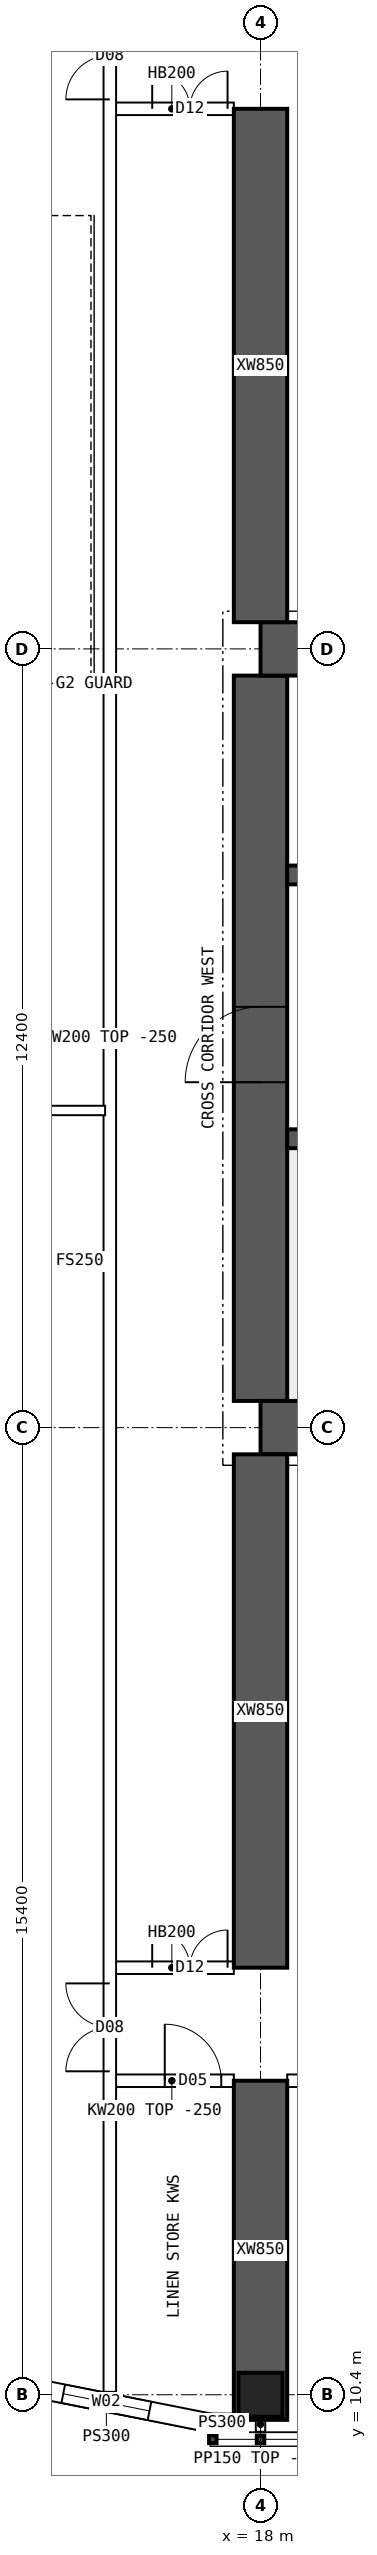
"""IFC4 building model, lengths in metres.
Left out: names, types, materials, properties, quantities, classifications, styles, units other than length and angle.
Written with IfcOpenShell. Run it as: python <this file> out.ifc"""

import sys

from ifc_helpers import new_model, si_unit, direction, frame, frame_2d, origin, origin_2d, place, context, subcontext, project, spatial, polyline, rectangle, hollow_rectangle, outline, extrude, element, fill, save


model = new_model("IFC4")
c1 = context("Model", 3, precision=1e-05, world=origin(), true_north=direction((0.0, 1.0)))
c2 = subcontext(c1, "Body", "Model", "MODEL_VIEW")
j1 = project(units=[si_unit("LENGTHUNIT", "METRE"), si_unit("PLANEANGLEUNIT", "RADIAN")], contexts=[c1])
p1 = place(None, origin())
s1 = spatial("IfcSite", under=j1, at=p1, CompositionType="ELEMENT")
p2 = place(p1, origin())
s2 = spatial("IfcBuilding", under=s1, at=p2, CompositionType="ELEMENT")
p3 = place(p2, frame((0.0, 0.0, 152.35)))
s3 = spatial("IfcBuildingStorey", under=s2, at=p3, CompositionType="ELEMENT", Elevation=152.35)
p4 = place(p3, frame((18.0, 10.4, 0.0), z_axis=(0.0, 0.0, 1.0), x_axis=(1.0, 0.0, 0.0)))
e1 = element("IfcColumn", 1, at=p4, inside=s3, PredefinedType="COLUMN", context=c2, shape_type="SweptSolid", body=[
    extrude(hollow_rectangle(XDim=0.7, YDim=0.7, WallThickness=0.07, at=origin_2d()), origin(), (0.0, 0.0, 1.0), 3.75),
])
for number, where, z_axis, x_axis in (
    (2, (18.0, 25.8, 0.0), (0.0, 0.0, 1.0), (1.0, 0.0, 0.0)),
    (3, (18.0, 38.2, 0.0), (0.0, 0.0, 1.0), (1.0, 0.0, 0.0)),
):
    element("IfcWall", number, at=place(p3, frame(where, z_axis=z_axis, x_axis=x_axis)), inside=s3, PredefinedType="SHEAR", context=c2, shape_type="SweptSolid", body=[
        extrude(rectangle(XDim=48.0, YDim=0.85, at=frame_2d((24.0, 0.0))), origin(), (0.0, 0.0, 1.0), 3.75),
    ])
p5 = place(p3, frame((18.0, 26.225, 0.0), z_axis=(0.0, 0.0, 1.0), x_axis=(0.0, 1.0, 0.0)))
e4 = element("IfcWall", 4, at=p5, inside=s3, PredefinedType="SHEAR", context=c2, shape_type="SweptSolid", body=[
    extrude(rectangle(XDim=11.55, YDim=0.85, at=frame_2d((5.775, 0.0))), origin(), (0.0, 0.0, 1.0), 3.75),
])
p6 = place(p5, frame((5.075, 0.0, 0.0)))
e5 = element("IfcOpeningElement", 5, at=p6, cuts=e4, PredefinedType="OPENING", context=c2, shape_type="SweptSolid", body=[
    extrude(rectangle(XDim=1.2, YDim=2.1, at=frame_2d((0.6, 1.05))), frame((0.0, 0.435, 0.0), z_axis=(0.0, -1.0, 0.0), x_axis=(1.0, 0.0, 0.0)), (0.0, 0.0, 1.0), 0.87),
])
p7 = place(p3, frame((18.425, 30.4, 0.0), z_axis=(0.0, 0.0, 1.0), x_axis=(1.0, 0.0, 0.0)))
e6 = element("IfcWall", 6, at=p7, inside=s3, PredefinedType="SHEAR", context=c2, shape_type="SweptSolid", body=[
    extrude(rectangle(XDim=47.15, YDim=0.3, at=frame_2d((23.575, 0.0))), origin(), (0.0, 0.0, 1.0), 3.75),
])
p8 = place(p7, frame((0.4, 0.0, 0.0)))
e7 = element("IfcOpeningElement", 7, at=p8, cuts=e6, PredefinedType="OPENING", context=c2, shape_type="SweptSolid", body=[
    extrude(rectangle(XDim=1.0, YDim=2.1, at=frame_2d((0.5, 1.05))), frame((0.0, 0.16, 0.0), z_axis=(0.0, -1.0, 0.0), x_axis=(1.0, 0.0, 0.0)), (0.0, 0.0, 1.0), 0.32),
])
p9 = place(p7, frame((45.75, 0.0, 0.0)))
e8 = element("IfcOpeningElement", 8, at=p9, cuts=e6, PredefinedType="OPENING", context=c2, shape_type="SweptSolid", body=[
    extrude(rectangle(XDim=1.0, YDim=2.1, at=frame_2d((0.5, 1.05))), frame((0.0, 0.16, 0.0), z_axis=(0.0, -1.0, 0.0), x_axis=(1.0, 0.0, 0.0)), (0.0, 0.0, 1.0), 0.32),
])
p10 = place(p7, frame((8.325, 0.0, 0.0)))
e9 = element("IfcOpeningElement", 9, at=p10, cuts=e6, PredefinedType="OPENING", context=c2, shape_type="SweptSolid", body=[
    extrude(rectangle(XDim=1.1, YDim=2.1, at=frame_2d((0.55, 1.05))), frame((0.0, 0.16, 0.0), z_axis=(0.0, -1.0, 0.0), x_axis=(1.0, 0.0, 0.0)), (0.0, 0.0, 1.0), 0.32),
])
p11 = place(p7, frame((10.925, 0.0, 0.0)))
e10 = element("IfcOpeningElement", 10, at=p11, cuts=e6, PredefinedType="OPENING", context=c2, shape_type="SweptSolid", body=[
    extrude(rectangle(XDim=1.1, YDim=2.1, at=frame_2d((0.55, 1.05))), frame((0.0, 0.16, 0.0), z_axis=(0.0, -1.0, 0.0), x_axis=(1.0, 0.0, 0.0)), (0.0, 0.0, 1.0), 0.32),
])
p12 = place(p7, frame((13.525, 0.0, 0.0)))
e11 = element("IfcOpeningElement", 11, at=p12, cuts=e6, PredefinedType="OPENING", context=c2, shape_type="SweptSolid", body=[
    extrude(rectangle(XDim=1.1, YDim=2.1, at=frame_2d((0.55, 1.05))), frame((0.0, 0.16, 0.0), z_axis=(0.0, -1.0, 0.0), x_axis=(1.0, 0.0, 0.0)), (0.0, 0.0, 1.0), 0.32),
])
p13 = place(p7, frame((16.125, 0.0, 0.0)))
e12 = element("IfcOpeningElement", 12, at=p13, cuts=e6, PredefinedType="OPENING", context=c2, shape_type="SweptSolid", body=[
    extrude(rectangle(XDim=1.1, YDim=2.1, at=frame_2d((0.55, 1.05))), frame((0.0, 0.16, 0.0), z_axis=(0.0, -1.0, 0.0), x_axis=(1.0, 0.0, 0.0)), (0.0, 0.0, 1.0), 0.32),
])
p14 = place(p7, frame((18.9, 0.0, 0.0)))
e13 = element("IfcOpeningElement", 13, at=p14, cuts=e6, PredefinedType="OPENING", context=c2, shape_type="SweptSolid", body=[
    extrude(rectangle(XDim=0.9, YDim=2.1, at=frame_2d((0.45, 1.05))), frame((0.0, 0.16, 0.0), z_axis=(0.0, -1.0, 0.0), x_axis=(1.0, 0.0, 0.0)), (0.0, 0.0, 1.0), 0.32),
])
p15 = place(p7, frame((30.192, 0.0, 0.0)))
e14 = element("IfcOpeningElement", 14, at=p15, cuts=e6, PredefinedType="OPENING", context=c2, shape_type="SweptSolid", body=[
    extrude(rectangle(XDim=1.1, YDim=2.1, at=frame_2d((0.55, 1.05))), frame((0.0, 0.16, 0.0), z_axis=(0.0, -1.0, 0.0), x_axis=(1.0, 0.0, 0.0)), (0.0, 0.0, 1.0), 0.32),
])
p16 = place(p7, frame((33.725, 0.0, 0.0)))
e15 = element("IfcOpeningElement", 15, at=p16, cuts=e6, PredefinedType="OPENING", context=c2, shape_type="SweptSolid", body=[
    extrude(rectangle(XDim=1.1, YDim=2.1, at=frame_2d((0.55, 1.05))), frame((0.0, 0.16, 0.0), z_axis=(0.0, -1.0, 0.0), x_axis=(1.0, 0.0, 0.0)), (0.0, 0.0, 1.0), 0.32),
])
p17 = place(p7, frame((37.258, 0.0, 0.0)))
e16 = element("IfcOpeningElement", 16, at=p17, cuts=e6, PredefinedType="OPENING", context=c2, shape_type="SweptSolid", body=[
    extrude(rectangle(XDim=1.1, YDim=2.1, at=frame_2d((0.55, 1.05))), frame((0.0, 0.16, 0.0), z_axis=(0.0, -1.0, 0.0), x_axis=(1.0, 0.0, 0.0)), (0.0, 0.0, 1.0), 0.32),
])
p18 = place(p3, frame((18.425, 34.6, 0.0), z_axis=(0.0, 0.0, 1.0), x_axis=(1.0, 0.0, 0.0)))
e17 = element("IfcWall", 17, at=p18, inside=s3, PredefinedType="SHEAR", context=c2, shape_type="SweptSolid", body=[
    extrude(rectangle(XDim=47.15, YDim=0.3, at=frame_2d((23.575, 0.0))), origin(), (0.0, 0.0, 1.0), 3.75),
])
p19 = place(p18, frame((0.9, 0.0, 0.0)))
e18 = element("IfcOpeningElement", 18, at=p19, cuts=e17, PredefinedType="OPENING", context=c2, shape_type="SweptSolid", body=[
    extrude(rectangle(XDim=1.1, YDim=2.1, at=frame_2d((0.55, 1.05))), frame((0.0, 0.16, 0.0), z_axis=(0.0, -1.0, 0.0), x_axis=(1.0, 0.0, 0.0)), (0.0, 0.0, 1.0), 0.32),
])
p20 = place(p18, frame((45.15, 0.0, 0.0)))
e19 = element("IfcOpeningElement", 19, at=p20, cuts=e17, PredefinedType="OPENING", context=c2, shape_type="SweptSolid", body=[
    extrude(rectangle(XDim=1.1, YDim=2.1, at=frame_2d((0.55, 1.05))), frame((0.0, 0.16, 0.0), z_axis=(0.0, -1.0, 0.0), x_axis=(1.0, 0.0, 0.0)), (0.0, 0.0, 1.0), 0.32),
])
p21 = place(p18, frame((4.175, 0.0, 0.0)))
e20 = element("IfcOpeningElement", 20, at=p21, cuts=e17, PredefinedType="OPENING", context=c2, shape_type="SweptSolid", body=[
    extrude(rectangle(XDim=0.9, YDim=2.1, at=frame_2d((0.45, 1.05))), frame((0.0, 0.16, 0.0), z_axis=(0.0, -1.0, 0.0), x_axis=(1.0, 0.0, 0.0)), (0.0, 0.0, 1.0), 0.32),
])
p22 = place(p18, frame((42.075, 0.0, 0.0)))
e21 = element("IfcOpeningElement", 21, at=p22, cuts=e17, PredefinedType="OPENING", context=c2, shape_type="SweptSolid", body=[
    extrude(rectangle(XDim=0.9, YDim=2.1, at=frame_2d((0.45, 1.05))), frame((0.0, 0.16, 0.0), z_axis=(0.0, -1.0, 0.0), x_axis=(1.0, 0.0, 0.0)), (0.0, 0.0, 1.0), 0.32),
])
p23 = place(p18, frame((8.95, 0.0, 0.0)))
e22 = element("IfcOpeningElement", 22, at=p23, cuts=e17, PredefinedType="OPENING", context=c2, shape_type="SweptSolid", body=[
    extrude(rectangle(XDim=0.9, YDim=2.1, at=frame_2d((0.45, 1.05))), frame((0.0, 0.16, 0.0), z_axis=(0.0, -1.0, 0.0), x_axis=(1.0, 0.0, 0.0)), (0.0, 0.0, 1.0), 0.32),
])
p24 = place(p18, frame((12.924, 0.0, 0.0)))
e23 = element("IfcOpeningElement", 23, at=p24, cuts=e17, PredefinedType="OPENING", context=c2, shape_type="SweptSolid", body=[
    extrude(rectangle(XDim=0.9, YDim=2.1, at=frame_2d((0.45, 1.05))), frame((0.0, 0.16, 0.0), z_axis=(0.0, -1.0, 0.0), x_axis=(1.0, 0.0, 0.0)), (0.0, 0.0, 1.0), 0.32),
])
p25 = place(p18, frame((16.571, 0.0, 0.0)))
e24 = element("IfcOpeningElement", 24, at=p25, cuts=e17, PredefinedType="OPENING", context=c2, shape_type="SweptSolid", body=[
    extrude(rectangle(XDim=0.9, YDim=2.1, at=frame_2d((0.45, 1.05))), frame((0.0, 0.16, 0.0), z_axis=(0.0, -1.0, 0.0), x_axis=(1.0, 0.0, 0.0)), (0.0, 0.0, 1.0), 0.32),
])
p26 = place(p18, frame((20.33, 0.0, 0.0)))
e25 = element("IfcOpeningElement", 25, at=p26, cuts=e17, PredefinedType="OPENING", context=c2, shape_type="SweptSolid", body=[
    extrude(rectangle(XDim=0.9, YDim=2.1, at=frame_2d((0.45, 1.05))), frame((0.0, 0.16, 0.0), z_axis=(0.0, -1.0, 0.0), x_axis=(1.0, 0.0, 0.0)), (0.0, 0.0, 1.0), 0.32),
])
p27 = place(p18, frame((24.736, 0.0, 0.0)))
e26 = element("IfcOpeningElement", 26, at=p27, cuts=e17, PredefinedType="OPENING", context=c2, shape_type="SweptSolid", body=[
    extrude(rectangle(XDim=0.9, YDim=2.1, at=frame_2d((0.45, 1.05))), frame((0.0, 0.16, 0.0), z_axis=(0.0, -1.0, 0.0), x_axis=(1.0, 0.0, 0.0)), (0.0, 0.0, 1.0), 0.32),
])
p28 = place(p18, frame((27.533, 0.0, 0.0)))
e27 = element("IfcOpeningElement", 27, at=p28, cuts=e17, PredefinedType="OPENING", context=c2, shape_type="SweptSolid", body=[
    extrude(rectangle(XDim=0.9, YDim=2.1, at=frame_2d((0.45, 1.05))), frame((0.0, 0.16, 0.0), z_axis=(0.0, -1.0, 0.0), x_axis=(1.0, 0.0, 0.0)), (0.0, 0.0, 1.0), 0.32),
])
p29 = place(p18, frame((29.703, 0.0, 0.0)))
e28 = element("IfcOpeningElement", 28, at=p29, cuts=e17, PredefinedType="OPENING", context=c2, shape_type="SweptSolid", body=[
    extrude(rectangle(XDim=0.9, YDim=2.1, at=frame_2d((0.45, 1.05))), frame((0.0, 0.16, 0.0), z_axis=(0.0, -1.0, 0.0), x_axis=(1.0, 0.0, 0.0)), (0.0, 0.0, 1.0), 0.32),
])
p30 = place(p18, frame((33.502, 0.0, 0.0)))
e29 = element("IfcOpeningElement", 29, at=p30, cuts=e17, PredefinedType="OPENING", context=c2, shape_type="SweptSolid", body=[
    extrude(rectangle(XDim=0.9, YDim=2.1, at=frame_2d((0.45, 1.05))), frame((0.0, 0.16, 0.0), z_axis=(0.0, -1.0, 0.0), x_axis=(1.0, 0.0, 0.0)), (0.0, 0.0, 1.0), 0.32),
])
p31 = place(p18, frame((37.453, 0.0, 0.0)))
e30 = element("IfcOpeningElement", 30, at=p31, cuts=e17, PredefinedType="OPENING", context=c2, shape_type="SweptSolid", body=[
    extrude(rectangle(XDim=0.9, YDim=2.1, at=frame_2d((0.45, 1.05))), frame((0.0, 0.16, 0.0), z_axis=(0.0, -1.0, 0.0), x_axis=(1.0, 0.0, 0.0)), (0.0, 0.0, 1.0), 0.32),
])
p32 = place(p3, frame((18.0, 10.0, 0.0), z_axis=(0.0, 0.0, 1.0), x_axis=(0.0, 1.0, 0.0)))
e31 = element("IfcWall", 31, at=p32, inside=s3, PredefinedType="SHEAR", context=c2, shape_type="SweptSolid", body=[
    extrude(rectangle(XDim=5.4, YDim=0.85, at=frame_2d((2.7, 0.0))), origin(), (0.0, 0.0, 1.0), 3.75),
])
for number, where, z_axis, x_axis in (
    (32, (18.0, 17.2, 0.0), (0.0, 0.0, 1.0), (0.0, 1.0, 0.0)),
    (33, (18.0, 38.625, 0.0), (0.0, 0.0, 1.0), (0.0, 1.0, 0.0)),
):
    element("IfcWall", number, at=place(p3, frame(where, z_axis=z_axis, x_axis=x_axis)), inside=s3, PredefinedType="SHEAR", context=c2, shape_type="SweptSolid", body=[
        extrude(rectangle(XDim=8.175, YDim=0.85, at=frame_2d((4.087, 0.0))), origin(), (0.0, 0.0, 1.0), 3.75),
    ])
p33 = place(p3, frame((13.89, 10.608, 0.0), z_axis=(0.0, 0.0, 1.0), x_axis=(0.98078325777, -0.195100490205, 0.0)))
e34 = element("IfcWall", 34, at=p33, inside=s3, PredefinedType="SOLIDWALL", context=c2, shape_type="SweptSolid", body=[
    extrude(outline(polyline([(-0.03, -0.15), (3.405, -0.15), (3.345, 0.15), (0.03, 0.15), (-0.03, -0.15)])), origin(), (0.0, 0.0, 1.0), 3.5),
])
p34 = place(p33, frame((0.988, 0.0, 0.9)))
e35 = element("IfcOpeningElement", 35, at=p34, cuts=e34, PredefinedType="OPENING", context=c2, shape_type="SweptSolid", body=[
    extrude(rectangle(XDim=1.4, YDim=1.8, at=frame_2d((0.7, 0.9))), frame((0.0, 0.16, 0.0), z_axis=(0.0, -1.0, 0.0), x_axis=(1.0, 0.0, 0.0)), (0.0, 0.0, 1.0), 0.32),
])
p35 = place(p3, frame((17.2, 9.95, 0.0), z_axis=(0.0, 0.0, 1.0), x_axis=(1.0, 0.0, 0.0)))
e36 = element("IfcWall", 36, at=p35, inside=s3, PredefinedType="SOLIDWALL", context=c2, shape_type="SweptSolid", body=[
    extrude(rectangle(XDim=0.375, YDim=0.3, at=frame_2d((0.188, 0.0))), origin(), (0.0, 0.0, 1.0), 3.5),
])
p36 = place(p3, frame((15.6, 15.4, 0.0), z_axis=(0.0, 0.0, 1.0), x_axis=(1.0, 0.0, 0.0)))
e37 = element("IfcWall", 37, at=p36, inside=s3, PredefinedType="SOLIDWALL", context=c2, shape_type="SweptSolid", body=[
    extrude(rectangle(XDim=1.975, YDim=0.2, at=frame_2d((0.987, 0.0))), origin(), (0.0, 0.0, 1.0), 3.5),
])
p37 = place(p36, frame((0.875, 0.0, 0.0)))
e38 = element("IfcOpeningElement", 38, at=p37, cuts=e37, PredefinedType="OPENING", context=c2, shape_type="SweptSolid", body=[
    extrude(rectangle(XDim=0.9, YDim=2.1, at=frame_2d((0.45, 1.05))), frame((0.0, 0.11, 0.0), z_axis=(0.0, -1.0, 0.0), x_axis=(1.0, 0.0, 0.0)), (0.0, 0.0, 1.0), 0.22),
])
p38 = place(p3, frame((15.6, 17.2, 0.0), z_axis=(0.0, 0.0, 1.0), x_axis=(1.0, 0.0, 0.0)))
e39 = element("IfcWall", 39, at=p38, inside=s3, PredefinedType="SOLIDWALL", context=c2, shape_type="SweptSolid", body=[
    extrude(rectangle(XDim=1.975, YDim=0.2, at=frame_2d((0.987, 0.0))), origin(), (0.0, 0.0, 1.0), 3.5),
])
p39 = place(p38, frame((0.675, 0.0, 0.0)))
e40 = element("IfcOpeningElement", 40, at=p39, cuts=e39, PredefinedType="OPENING", context=c2, shape_type="SweptSolid", body=[
    extrude(rectangle(XDim=1.2, YDim=2.1, at=frame_2d((0.6, 1.05))), frame((0.0, 0.11, 0.0), z_axis=(0.0, -1.0, 0.0), x_axis=(1.0, 0.0, 0.0)), (0.0, 0.0, 1.0), 0.22),
])
p40 = place(p3, frame((18.425, 15.4, 0.0), z_axis=(0.0, 0.0, 1.0), x_axis=(1.0, 0.0, 0.0)))
e41 = element("IfcWall", 41, at=p40, inside=s3, PredefinedType="SOLIDWALL", context=c2, shape_type="SweptSolid", body=[
    extrude(outline(polyline([(0.0, 0.0), (5.15, 0.0), (5.15, 3.1), (0.0, 3.1), (0.0, 0.0)])), frame((0.0, 0.1, 0.0), z_axis=(0.0, -1.0, 0.0), x_axis=(1.0, 0.0, 0.0)), (0.0, 0.0, 1.0), 0.2),
])
p41 = place(p40, frame((0.6, 0.0, 0.0)))
e42 = element("IfcOpeningElement", 42, at=p41, cuts=e41, PredefinedType="OPENING", context=c2, shape_type="SweptSolid", body=[
    extrude(rectangle(XDim=1.0, YDim=2.1, at=frame_2d((0.5, 1.05))), frame((0.0, 0.11, 0.0), z_axis=(0.0, -1.0, 0.0), x_axis=(1.0, 0.0, 0.0)), (0.0, 0.0, 1.0), 0.22),
])
p42 = place(p3, frame((15.6, 46.8, 0.0), z_axis=(0.0, 0.0, 1.0), x_axis=(1.0, 0.0, 0.0)))
e43 = element("IfcWall", 43, at=p42, inside=s3, PredefinedType="SOLIDWALL", context=c2, shape_type="SweptSolid", body=[
    extrude(rectangle(XDim=1.975, YDim=0.2, at=frame_2d((0.987, 0.0))), origin(), (0.0, 0.0, 1.0), 3.5),
])
p43 = place(p42, frame((0.675, 0.0, 0.0)))
e44 = element("IfcOpeningElement", 44, at=p43, cuts=e43, PredefinedType="OPENING", context=c2, shape_type="SweptSolid", body=[
    extrude(rectangle(XDim=1.2, YDim=2.1, at=frame_2d((0.6, 1.05))), frame((0.0, 0.11, 0.0), z_axis=(0.0, -1.0, 0.0), x_axis=(1.0, 0.0, 0.0)), (0.0, 0.0, 1.0), 0.22),
])
p44 = place(p3, frame((8.705, 30.85, 0.0), z_axis=(0.0, 0.0, 1.0), x_axis=(1.0, 0.0, 0.0)))
e45 = element("IfcWall", 45, at=p44, inside=s3, PredefinedType="PARTITIONING", context=c2, shape_type="SweptSolid", body=[
    extrude(outline(polyline([(0.0, 0.0), (6.82, 0.0), (6.82, 3.5), (3.597, 3.5), (3.595, 3.05), (2.997, 3.05), (2.995, 3.5), (0.0, 3.5), (0.0, 0.0)])), frame((0.0, 0.075, 0.0), z_axis=(0.0, -1.0, 0.0), x_axis=(1.0, 0.0, 0.0)), (0.0, 0.0, 1.0), 0.15),
])
p45 = place(p3, frame((15.6, 10.446, 0.0), z_axis=(0.0, 0.0, 1.0), x_axis=(0.0, 1.0, 0.0)))
e46 = element("IfcWall", 46, at=p45, inside=s3, PredefinedType="SOLIDWALL", context=c2, shape_type="SweptSolid", body=[
    extrude(rectangle(XDim=43.107, YDim=0.2, at=frame_2d((21.554, 0.0))), origin(), (0.0, 0.0, 1.0), 3.5),
])
p46 = place(p45, frame((5.104, 0.0, 0.0)))
e47 = element("IfcOpeningElement", 47, at=p46, cuts=e46, PredefinedType="OPENING", context=c2, shape_type="SweptSolid", body=[
    extrude(rectangle(XDim=1.4, YDim=2.1, at=frame_2d((0.7, 1.05))), frame((0.0, 0.11, 0.0), z_axis=(0.0, -1.0, 0.0), x_axis=(1.0, 0.0, 0.0)), (0.0, 0.0, 1.0), 0.22),
])
p47 = place(p45, frame((36.504, 0.0, 0.0)))
e48 = element("IfcOpeningElement", 48, at=p47, cuts=e46, PredefinedType="OPENING", context=c2, shape_type="SweptSolid", body=[
    extrude(rectangle(XDim=1.4, YDim=2.1, at=frame_2d((0.7, 1.05))), frame((0.0, 0.11, 0.0), z_axis=(0.0, -1.0, 0.0), x_axis=(1.0, 0.0, 0.0)), (0.0, 0.0, 1.0), 0.22),
])
p48 = place(p3, frame((18.0, 10.05, 0.0), z_axis=(0.0, 0.0, 1.0), x_axis=(0.0, -1.0, 0.0)))
e49 = element("IfcWall", 49, at=p48, inside=s3, PredefinedType="PARTITIONING", context=c2, shape_type="SweptSolid", body=[
    extrude(rectangle(XDim=0.24, YDim=0.15, at=frame_2d((0.12, 0.0))), origin(), (0.0, 0.0, 1.0), 3.5),
])
p49 = place(p34, origin())
e50 = element("IfcWindow", 50, at=p49, inside=s3, PartitioningType="SINGLE_PANEL", PredefinedType="WINDOW", context=c2, shape_type="SweptSolid", body=[
    extrude(rectangle(XDim=1.4, YDim=1.8, at=frame_2d((0.7, 0.9))), frame((0.0, 0.03, 0.0), z_axis=(0.0, -1.0, 0.0), x_axis=(1.0, 0.0, 0.0)), (0.0, 0.0, 1.0), 0.06),
])
fill(e35, e50)
p50 = place(p6, origin())
e51 = element("IfcDoor", 51, at=p50, inside=s3, OperationType="SINGLE_SWING_LEFT", PredefinedType="DOOR", context=c2, shape_type="SweptSolid", body=[
    extrude(rectangle(XDim=1.2, YDim=2.1, at=frame_2d((0.6, 1.05))), frame((0.0, 0.025, 0.0), z_axis=(0.0, -1.0, 0.0), x_axis=(1.0, 0.0, 0.0)), (0.0, 0.0, 1.0), 0.05),
])
fill(e5, e51)
p51 = place(p39, origin())
e52 = element("IfcDoor", 52, at=p51, inside=s3, OperationType="DOUBLE_DOOR_SINGLE_SWING", PredefinedType="DOOR", context=c2, shape_type="SweptSolid", body=[
    extrude(rectangle(XDim=1.2, YDim=2.1, at=frame_2d((0.6, 1.05))), frame((0.0, 0.025, 0.0), z_axis=(0.0, -1.0, 0.0), x_axis=(1.0, 0.0, 0.0)), (0.0, 0.0, 1.0), 0.05),
])
fill(e40, e52)
p52 = place(p43, origin())
e53 = element("IfcDoor", 53, at=p52, inside=s3, OperationType="DOUBLE_DOOR_SINGLE_SWING", PredefinedType="DOOR", context=c2, shape_type="SweptSolid", body=[
    extrude(rectangle(XDim=1.2, YDim=2.1, at=frame_2d((0.6, 1.05))), frame((0.0, 0.025, 0.0), z_axis=(0.0, -1.0, 0.0), x_axis=(1.0, 0.0, 0.0)), (0.0, 0.0, 1.0), 0.05),
])
fill(e44, e53)
p53 = place(p46, origin())
e54 = element("IfcDoor", 54, at=p53, inside=s3, OperationType="DOUBLE_DOOR_SINGLE_SWING", PredefinedType="DOOR", context=c2, shape_type="SweptSolid", body=[
    extrude(rectangle(XDim=1.4, YDim=2.1, at=frame_2d((0.7, 1.05))), frame((0.0, 0.025, 0.0), z_axis=(0.0, -1.0, 0.0), x_axis=(1.0, 0.0, 0.0)), (0.0, 0.0, 1.0), 0.05),
])
fill(e47, e54)
p54 = place(p47, origin())
e55 = element("IfcDoor", 55, at=p54, inside=s3, OperationType="DOUBLE_DOOR_SINGLE_SWING", PredefinedType="DOOR", context=c2, shape_type="SweptSolid", body=[
    extrude(rectangle(XDim=1.4, YDim=2.1, at=frame_2d((0.7, 1.05))), frame((0.0, 0.025, 0.0), z_axis=(0.0, -1.0, 0.0), x_axis=(1.0, 0.0, 0.0)), (0.0, 0.0, 1.0), 0.05),
])
fill(e48, e55)
p55 = place(p37, origin())
e56 = element("IfcDoor", 56, at=p55, inside=s3, OperationType="SINGLE_SWING_LEFT", PredefinedType="DOOR", context=c2, shape_type="SweptSolid", body=[
    extrude(rectangle(XDim=0.9, YDim=2.1, at=frame_2d((0.45, 1.05))), frame((0.0, 0.025, 0.0), z_axis=(0.0, -1.0, 0.0), x_axis=(1.0, 0.0, 0.0)), (0.0, 0.0, 1.0), 0.05),
])
fill(e38, e56)
save(model, sys.argv[1])
